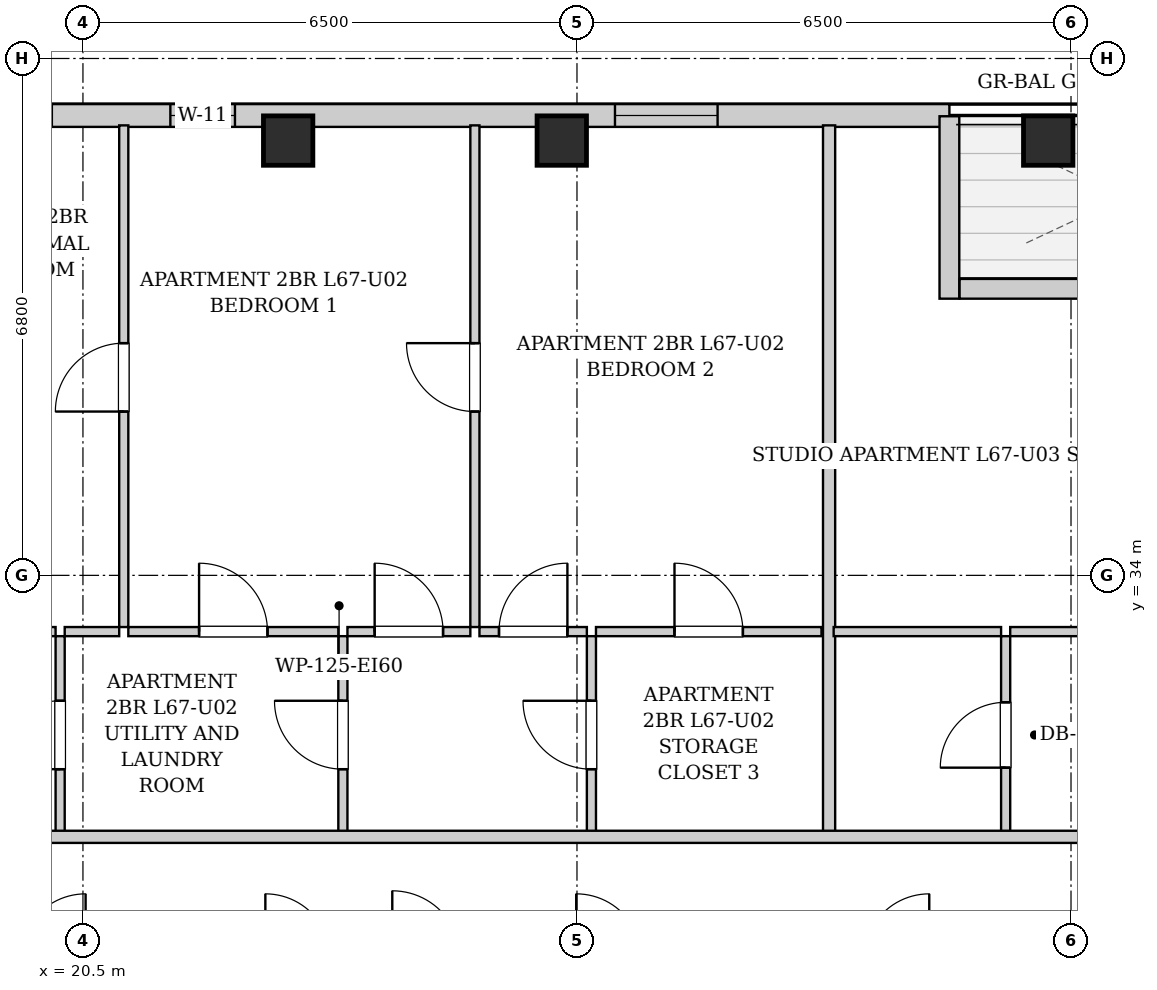
"""IFC4 building model, lengths in metres.
Left out: names, types, materials, properties, quantities, classifications, styles, units other than length and angle.
Written with IfcOpenShell. Run it as: python <this file> out.ifc"""

import sys

from ifc_helpers import new_model, si_unit, direction, frame, frame_2d, origin, origin_2d, place, context, subcontext, project, spatial, rectangle, extrude, element, fill, save


model = new_model("IFC4")
c1 = context("Model", 3, precision=1e-05, world=origin(), true_north=direction((0.0, 1.0)))
c2 = subcontext(c1, "Body", "Model", "MODEL_VIEW")
j1 = project(units=[si_unit("LENGTHUNIT", "METRE"), si_unit("PLANEANGLEUNIT", "RADIAN")], contexts=[c1])
p1 = place(None, origin())
s1 = spatial("IfcSite", under=j1, at=p1, CompositionType="ELEMENT")
p2 = place(p1, origin())
s2 = spatial("IfcBuilding", under=s1, at=p2, CompositionType="ELEMENT")
p3 = place(p2, frame((0.0, 0.0, 230.9)))
s3 = spatial("IfcBuildingStorey", under=s2, at=p3, CompositionType="ELEMENT", Elevation=230.9)
for number, where, z_axis, x_axis in (
    (1, (23.2, 39.72, 0.0), (0.0, 0.0, 1.0), (1.0, 0.0, 0.0)),
    (2, (26.8, 39.72, 0.0), (0.0, 0.0, 1.0), (1.0, 0.0, 0.0)),
    (3, (33.2, 39.72, 0.0), (0.0, 0.0, 1.0), (1.0, 0.0, 0.0)),
):
    element("IfcColumn", number, at=place(p3, frame(where, z_axis=z_axis, x_axis=x_axis)), inside=s3, PredefinedType="COLUMN", context=c2, shape_type="SweptSolid", body=[
        extrude(rectangle(XDim=0.65, YDim=0.65, at=origin_2d()), origin(), (0.0, 0.0, 1.0), 3.4),
    ])
p4 = place(p3, frame((13.1, 40.05, 0.0), z_axis=(0.0, 0.0, 1.0), x_axis=(1.0, 0.0, 0.0)))
e4 = element("IfcWall", 4, at=p4, inside=s3, PredefinedType="SOLIDWALL", context=c2, shape_type="SweptSolid", body=[
    extrude(rectangle(XDim=18.8, YDim=0.3, at=frame_2d((9.4, 0.0))), origin(), (0.0, 0.0, 1.0), 3.14),
])
p5 = place(p4, frame((1.806, 0.0, 0.55)))
e5 = element("IfcOpeningElement", 5, at=p5, cuts=e4, PredefinedType="OPENING", context=c2, shape_type="SweptSolid", body=[
    extrude(rectangle(XDim=1.35, YDim=1.2, at=frame_2d((0.675, 0.6))), frame((0.0, 0.16, 0.0), z_axis=(0.0, -1.0, 0.0), x_axis=(1.0, 0.0, 0.0)), (0.0, 0.0, 1.0), 0.32),
])
p6 = place(p4, frame((5.641, 0.0, 0.55)))
e6 = element("IfcOpeningElement", 6, at=p6, cuts=e4, PredefinedType="OPENING", context=c2, shape_type="SweptSolid", body=[
    extrude(rectangle(XDim=1.35, YDim=1.2, at=frame_2d((0.675, 0.6))), frame((0.0, 0.16, 0.0), z_axis=(0.0, -1.0, 0.0), x_axis=(1.0, 0.0, 0.0)), (0.0, 0.0, 1.0), 0.32),
])
p7 = place(p4, frame((8.55, 0.0, 0.55)))
e7 = element("IfcOpeningElement", 7, at=p7, cuts=e4, PredefinedType="OPENING", context=c2, shape_type="SweptSolid", body=[
    extrude(rectangle(XDim=0.85, YDim=1.2, at=frame_2d((0.425, 0.6))), frame((0.0, 0.16, 0.0), z_axis=(0.0, -1.0, 0.0), x_axis=(1.0, 0.0, 0.0)), (0.0, 0.0, 1.0), 0.32),
])
p8 = place(p4, frame((14.4, 0.0, 0.55)))
e8 = element("IfcOpeningElement", 8, at=p8, cuts=e4, PredefinedType="OPENING", context=c2, shape_type="SweptSolid", body=[
    extrude(rectangle(XDim=1.35, YDim=1.2, at=frame_2d((0.675, 0.6))), frame((0.0, 0.16, 0.0), z_axis=(0.0, -1.0, 0.0), x_axis=(1.0, 0.0, 0.0)), (0.0, 0.0, 1.0), 0.32),
])
p9 = place(p3, frame((31.9, 40.04, 0.0), z_axis=(0.0, 0.0, 1.0), x_axis=(0.0, -1.0, 0.0)))
e9 = element("IfcWall", 9, at=p9, inside=s3, PredefinedType="SOLIDWALL", context=c2, shape_type="SweptSolid", body=[
    extrude(rectangle(XDim=2.4, YDim=0.26, at=frame_2d((1.2, 0.0))), origin(), (0.0, 0.0, 1.0), 3.14),
])
p10 = place(p3, frame((32.034, 37.77, 0.0), z_axis=(0.0, 0.0, 1.0), x_axis=(1.0, 0.0, 0.0)))
e10 = element("IfcWall", 10, at=p10, inside=s3, PredefinedType="SOLIDWALL", context=c2, shape_type="SweptSolid", body=[
    extrude(rectangle(XDim=4.332, YDim=0.26, at=frame_2d((2.166, 0.0))), origin(), (0.0, 0.0, 1.0), 3.14),
])
p11 = place(p10, frame((1.616, 0.0, 0.0)))
e11 = element("IfcOpeningElement", 11, at=p11, cuts=e10, PredefinedType="OPENING", context=c2, shape_type="SweptSolid", body=[
    extrude(rectangle(XDim=1.1, YDim=2.0, at=frame_2d((0.55, 1.0))), frame((0.0, 0.14, 0.0), z_axis=(0.0, -1.0, 0.0), x_axis=(1.0, 0.0, 0.0)), (0.0, 0.0, 1.0), 0.28),
])
p12 = place(p3, frame((20.2, 30.6, 0.0), z_axis=(0.0, 0.0, 1.0), x_axis=(0.0, 1.0, 0.0)))
e12 = element("IfcWall", 12, at=p12, inside=s3, PredefinedType="PARTITIONING", context=c2, shape_type="SweptSolid", body=[
    extrude(rectangle(XDim=2.6, YDim=0.12, at=frame_2d((1.3, 0.0))), origin(), (0.0, 0.0, 1.0), 3.14),
])
p13 = place(p12, frame((0.85, 0.0, 0.0)))
e13 = element("IfcOpeningElement", 13, at=p13, cuts=e12, PredefinedType="OPENING", context=c2, shape_type="SweptSolid", body=[
    extrude(rectangle(XDim=0.9, YDim=2.05, at=frame_2d((0.45, 1.025))), frame((0.0, 0.07, 0.0), z_axis=(0.0, -1.0, 0.0), x_axis=(1.0, 0.0, 0.0)), (0.0, 0.0, 1.0), 0.14),
])
p14 = place(p3, frame((17.86, 33.26, 0.0), z_axis=(0.0, 0.0, 1.0), x_axis=(1.0, 0.0, 0.0)))
e14 = element("IfcWall", 14, at=p14, inside=s3, PredefinedType="PARTITIONING", context=c2, shape_type="SweptSolid", body=[
    extrude(rectangle(XDim=2.28, YDim=0.12, at=frame_2d((1.14, 0.0))), origin(), (0.0, 0.0, 1.0), 3.14),
])
p15 = place(p14, frame((0.69, 0.0, 0.0)))
e15 = element("IfcOpeningElement", 15, at=p15, cuts=e14, PredefinedType="OPENING", context=c2, shape_type="SweptSolid", body=[
    extrude(rectangle(XDim=0.9, YDim=2.05, at=frame_2d((0.45, 1.025))), frame((0.0, 0.07, 0.0), z_axis=(0.0, -1.0, 0.0), x_axis=(1.0, 0.0, 0.0)), (0.0, 0.0, 1.0), 0.14),
])
p16 = place(p3, frame((23.92, 30.6, 0.0), z_axis=(0.0, 0.0, 1.0), x_axis=(0.0, 1.0, 0.0)))
e16 = element("IfcWall", 16, at=p16, inside=s3, PredefinedType="PARTITIONING", context=c2, shape_type="SweptSolid", body=[
    extrude(rectangle(XDim=2.6, YDim=0.12, at=frame_2d((1.3, 0.0))), origin(), (0.0, 0.0, 1.0), 3.14),
])
p17 = place(p16, frame((0.85, 0.0, 0.0)))
e17 = element("IfcOpeningElement", 17, at=p17, cuts=e16, PredefinedType="OPENING", context=c2, shape_type="SweptSolid", body=[
    extrude(rectangle(XDim=0.9, YDim=2.05, at=frame_2d((0.45, 1.025))), frame((0.0, 0.07, 0.0), z_axis=(0.0, -1.0, 0.0), x_axis=(1.0, 0.0, 0.0)), (0.0, 0.0, 1.0), 0.14),
])
p18 = place(p3, frame((20.26, 33.26, 0.0), z_axis=(0.0, 0.0, 1.0), x_axis=(1.0, 0.0, 0.0)))
e18 = element("IfcWall", 18, at=p18, inside=s3, PredefinedType="PARTITIONING", context=c2, shape_type="SweptSolid", body=[
    extrude(rectangle(XDim=0.717, YDim=0.12, at=frame_2d((0.358, 0.0))), origin(), (0.0, 0.0, 1.0), 3.14),
])
p19 = place(p3, frame((21.097, 33.26, 0.0), z_axis=(0.0, 0.0, 1.0), x_axis=(1.0, 0.0, 0.0)))
e19 = element("IfcWall", 19, at=p19, inside=s3, PredefinedType="PARTITIONING", context=c2, shape_type="SweptSolid", body=[
    extrude(rectangle(XDim=2.763, YDim=0.12, at=frame_2d((1.382, 0.0))), origin(), (0.0, 0.0, 1.0), 3.14),
])
p20 = place(p19, frame((0.931, 0.0, 0.0)))
e20 = element("IfcOpeningElement", 20, at=p20, cuts=e19, PredefinedType="OPENING", context=c2, shape_type="SweptSolid", body=[
    extrude(rectangle(XDim=0.9, YDim=2.05, at=frame_2d((0.45, 1.025))), frame((0.0, 0.07, 0.0), z_axis=(0.0, -1.0, 0.0), x_axis=(1.0, 0.0, 0.0)), (0.0, 0.0, 1.0), 0.14),
])
p21 = place(p3, frame((27.19, 30.6, 0.0), z_axis=(0.0, 0.0, 1.0), x_axis=(0.0, 1.0, 0.0)))
e21 = element("IfcWall", 21, at=p21, inside=s3, PredefinedType="PARTITIONING", context=c2, shape_type="SweptSolid", body=[
    extrude(rectangle(XDim=2.6, YDim=0.12, at=frame_2d((1.3, 0.0))), origin(), (0.0, 0.0, 1.0), 3.14),
])
p22 = place(p21, frame((0.85, 0.0, 0.0)))
e22 = element("IfcOpeningElement", 22, at=p22, cuts=e21, PredefinedType="OPENING", context=c2, shape_type="SweptSolid", body=[
    extrude(rectangle(XDim=0.9, YDim=2.05, at=frame_2d((0.45, 1.025))), frame((0.0, 0.07, 0.0), z_axis=(0.0, -1.0, 0.0), x_axis=(1.0, 0.0, 0.0)), (0.0, 0.0, 1.0), 0.14),
])
p23 = place(p3, frame((23.98, 33.26, 0.0), z_axis=(0.0, 0.0, 1.0), x_axis=(1.0, 0.0, 0.0)))
e23 = element("IfcWall", 23, at=p23, inside=s3, PredefinedType="PARTITIONING", context=c2, shape_type="SweptSolid", body=[
    extrude(rectangle(XDim=1.617, YDim=0.12, at=frame_2d((0.809, 0.0))), origin(), (0.0, 0.0, 1.0), 3.14),
])
p24 = place(p23, frame((0.358, 0.0, 0.0)))
e24 = element("IfcOpeningElement", 24, at=p24, cuts=e23, PredefinedType="OPENING", context=c2, shape_type="SweptSolid", body=[
    extrude(rectangle(XDim=0.9, YDim=2.05, at=frame_2d((0.45, 1.025))), frame((0.0, 0.07, 0.0), z_axis=(0.0, -1.0, 0.0), x_axis=(1.0, 0.0, 0.0)), (0.0, 0.0, 1.0), 0.14),
])
p25 = place(p3, frame((25.717, 33.26, 0.0), z_axis=(0.0, 0.0, 1.0), x_axis=(1.0, 0.0, 0.0)))
e25 = element("IfcWall", 25, at=p25, inside=s3, PredefinedType="PARTITIONING", context=c2, shape_type="SweptSolid", body=[
    extrude(rectangle(XDim=1.413, YDim=0.12, at=frame_2d((0.707, 0.0))), origin(), (0.0, 0.0, 1.0), 3.14),
])
p26 = place(p25, frame((0.257, 0.0, 0.0)))
e26 = element("IfcOpeningElement", 26, at=p26, cuts=e25, PredefinedType="OPENING", context=c2, shape_type="SweptSolid", body=[
    extrude(rectangle(XDim=0.9, YDim=2.05, at=frame_2d((0.45, 1.025))), frame((0.0, 0.07, 0.0), z_axis=(0.0, -1.0, 0.0), x_axis=(1.0, 0.0, 0.0)), (0.0, 0.0, 1.0), 0.14),
])
p27 = place(p3, frame((27.25, 33.26, 0.0), z_axis=(0.0, 0.0, 1.0), x_axis=(1.0, 0.0, 0.0)))
e27 = element("IfcWall", 27, at=p27, inside=s3, PredefinedType="PARTITIONING", context=c2, shape_type="SweptSolid", body=[
    extrude(rectangle(XDim=2.967, YDim=0.12, at=frame_2d((1.483, 0.0))), origin(), (0.0, 0.0, 1.0), 3.14),
])
p28 = place(p27, frame((1.033, 0.0, 0.0)))
e28 = element("IfcOpeningElement", 28, at=p28, cuts=e27, PredefinedType="OPENING", context=c2, shape_type="SweptSolid", body=[
    extrude(rectangle(XDim=0.9, YDim=2.05, at=frame_2d((0.45, 1.025))), frame((0.0, 0.07, 0.0), z_axis=(0.0, -1.0, 0.0), x_axis=(1.0, 0.0, 0.0)), (0.0, 0.0, 1.0), 0.14),
])
p29 = place(p3, frame((21.037, 33.32, 0.0), z_axis=(0.0, 0.0, 1.0), x_axis=(0.0, 1.0, 0.0)))
e29 = element("IfcWall", 29, at=p29, inside=s3, PredefinedType="PARTITIONING", context=c2, shape_type="SweptSolid", body=[
    extrude(rectangle(XDim=6.6, YDim=0.12, at=frame_2d((3.3, 0.0))), origin(), (0.0, 0.0, 1.0), 3.14),
])
p30 = place(p29, frame((2.835, 0.0, 0.0)))
e30 = element("IfcOpeningElement", 30, at=p30, cuts=e29, PredefinedType="OPENING", context=c2, shape_type="SweptSolid", body=[
    extrude(rectangle(XDim=0.9, YDim=2.05, at=frame_2d((0.45, 1.025))), frame((0.0, 0.07, 0.0), z_axis=(0.0, -1.0, 0.0), x_axis=(1.0, 0.0, 0.0)), (0.0, 0.0, 1.0), 0.14),
])
p31 = place(p3, frame((25.657, 33.32, 0.0), z_axis=(0.0, 0.0, 1.0), x_axis=(0.0, 1.0, 0.0)))
e31 = element("IfcWall", 31, at=p31, inside=s3, PredefinedType="PARTITIONING", context=c2, shape_type="SweptSolid", body=[
    extrude(rectangle(XDim=6.6, YDim=0.12, at=frame_2d((3.3, 0.0))), origin(), (0.0, 0.0, 1.0), 3.14),
])
p32 = place(p31, frame((2.835, 0.0, 0.0)))
e32 = element("IfcOpeningElement", 32, at=p32, cuts=e31, PredefinedType="OPENING", context=c2, shape_type="SweptSolid", body=[
    extrude(rectangle(XDim=0.9, YDim=2.05, at=frame_2d((0.45, 1.025))), frame((0.0, 0.07, 0.0), z_axis=(0.0, -1.0, 0.0), x_axis=(1.0, 0.0, 0.0)), (0.0, 0.0, 1.0), 0.14),
])
p33 = place(p3, frame((30.317, 30.6, 0.0), z_axis=(0.0, 0.0, 1.0), x_axis=(0.0, 1.0, 0.0)))
e33 = element("IfcWall", 33, at=p33, inside=s3, PredefinedType="PARTITIONING", context=c2, shape_type="SweptSolid", body=[
    extrude(rectangle(XDim=9.32, YDim=0.16, at=frame_2d((4.66, 0.0))), origin(), (0.0, 0.0, 1.0), 3.14),
])
p34 = place(p3, frame((32.64, 30.6, 0.0), z_axis=(0.0, 0.0, 1.0), x_axis=(0.0, 1.0, 0.0)))
e34 = element("IfcWall", 34, at=p34, inside=s3, PredefinedType="PARTITIONING", context=c2, shape_type="SweptSolid", body=[
    extrude(rectangle(XDim=2.6, YDim=0.12, at=frame_2d((1.3, 0.0))), origin(), (0.0, 0.0, 1.0), 3.14),
])
p35 = place(p34, frame((0.87, 0.0, 0.0)))
e35 = element("IfcOpeningElement", 35, at=p35, cuts=e34, PredefinedType="OPENING", context=c2, shape_type="SweptSolid", body=[
    extrude(rectangle(XDim=0.86, YDim=2.05, at=frame_2d((0.43, 1.025))), frame((0.0, 0.07, 0.0), z_axis=(0.0, -1.0, 0.0), x_axis=(1.0, 0.0, 0.0)), (0.0, 0.0, 1.0), 0.14),
])
p36 = place(p3, frame((30.377, 33.26, 0.0), z_axis=(0.0, 0.0, 1.0), x_axis=(1.0, 0.0, 0.0)))
e36 = element("IfcWall", 36, at=p36, inside=s3, PredefinedType="PARTITIONING", context=c2, shape_type="SweptSolid", body=[
    extrude(rectangle(XDim=2.203, YDim=0.12, at=frame_2d((1.102, 0.0))), origin(), (0.0, 0.0, 1.0), 3.14),
])
p37 = place(p3, frame((32.7, 33.26, 0.0), z_axis=(0.0, 0.0, 1.0), x_axis=(1.0, 0.0, 0.0)))
e37 = element("IfcWall", 37, at=p37, inside=s3, PredefinedType="PARTITIONING", context=c2, shape_type="SweptSolid", body=[
    extrude(rectangle(XDim=5.02, YDim=0.12, at=frame_2d((2.51, 0.0))), origin(), (0.0, 0.0, 1.0), 3.14),
])
p38 = place(p37, frame((2.06, 0.0, 0.0)))
e38 = element("IfcOpeningElement", 38, at=p38, cuts=e37, PredefinedType="OPENING", context=c2, shape_type="SweptSolid", body=[
    extrude(rectangle(XDim=0.9, YDim=2.05, at=frame_2d((0.45, 1.025))), frame((0.0, 0.07, 0.0), z_axis=(0.0, -1.0, 0.0), x_axis=(1.0, 0.0, 0.0)), (0.0, 0.0, 1.0), 0.14),
])
p39 = place(p3, frame((13.15, 30.56, 0.0), z_axis=(0.0, 0.0, 1.0), x_axis=(1.0, 0.0, 0.0)))
e39 = element("IfcWall", 39, at=p39, inside=s3, PredefinedType="PARTITIONING", context=c2, shape_type="SweptSolid", body=[
    extrude(rectangle(XDim=24.6, YDim=0.16, at=frame_2d((12.3, 0.0))), origin(), (0.0, 0.0, 1.0), 3.14),
])
p40 = place(p39, frame((5.185, 0.0, 0.0)))
e40 = element("IfcOpeningElement", 40, at=p40, cuts=e39, PredefinedType="OPENING", context=c2, shape_type="SweptSolid", body=[
    extrude(rectangle(XDim=0.95, YDim=2.1, at=frame_2d((0.475, 1.05))), frame((0.0, 0.09, 0.0), z_axis=(0.0, -1.0, 0.0), x_axis=(1.0, 0.0, 0.0)), (0.0, 0.0, 1.0), 0.18),
])
p41 = place(p39, frame((21.55, 0.0, 0.0)))
e41 = element("IfcOpeningElement", 41, at=p41, cuts=e39, PredefinedType="OPENING", context=c2, shape_type="SweptSolid", body=[
    extrude(rectangle(XDim=0.95, YDim=2.1, at=frame_2d((0.475, 1.05))), frame((0.0, 0.09, 0.0), z_axis=(0.0, -1.0, 0.0), x_axis=(1.0, 0.0, 0.0)), (0.0, 0.0, 1.0), 0.18),
])
p42 = place(p13, origin())
e42 = element("IfcDoor", 42, at=p42, inside=s3, OperationType="SINGLE_SWING_LEFT", PredefinedType="DOOR", context=c2, shape_type="SweptSolid", body=[
    extrude(rectangle(XDim=0.9, YDim=2.05, at=frame_2d((0.45, 1.025))), frame((0.0, 0.025, 0.0), z_axis=(0.0, -1.0, 0.0), x_axis=(1.0, 0.0, 0.0)), (0.0, 0.0, 1.0), 0.05),
])
fill(e13, e42)
p43 = place(p17, origin())
e43 = element("IfcDoor", 43, at=p43, inside=s3, OperationType="SINGLE_SWING_RIGHT", PredefinedType="DOOR", context=c2, shape_type="SweptSolid", body=[
    extrude(rectangle(XDim=0.9, YDim=2.05, at=frame_2d((0.45, 1.025))), frame((0.0, 0.025, 0.0), z_axis=(0.0, -1.0, 0.0), x_axis=(1.0, 0.0, 0.0)), (0.0, 0.0, 1.0), 0.05),
])
fill(e17, e43)
p44 = place(p20, origin())
e44 = element("IfcDoor", 44, at=p44, inside=s3, OperationType="SINGLE_SWING_LEFT", PredefinedType="DOOR", context=c2, shape_type="SweptSolid", body=[
    extrude(rectangle(XDim=0.9, YDim=2.05, at=frame_2d((0.45, 1.025))), frame((0.0, 0.025, 0.0), z_axis=(0.0, -1.0, 0.0), x_axis=(1.0, 0.0, 0.0)), (0.0, 0.0, 1.0), 0.05),
])
fill(e20, e44)
p45 = place(p22, origin())
e45 = element("IfcDoor", 45, at=p45, inside=s3, OperationType="SINGLE_SWING_RIGHT", PredefinedType="DOOR", context=c2, shape_type="SweptSolid", body=[
    extrude(rectangle(XDim=0.9, YDim=2.05, at=frame_2d((0.45, 1.025))), frame((0.0, 0.025, 0.0), z_axis=(0.0, -1.0, 0.0), x_axis=(1.0, 0.0, 0.0)), (0.0, 0.0, 1.0), 0.05),
])
fill(e22, e45)
p46 = place(p24, origin())
e46 = element("IfcDoor", 46, at=p46, inside=s3, OperationType="SINGLE_SWING_LEFT", PredefinedType="DOOR", context=c2, shape_type="SweptSolid", body=[
    extrude(rectangle(XDim=0.9, YDim=2.05, at=frame_2d((0.45, 1.025))), frame((0.0, 0.025, 0.0), z_axis=(0.0, -1.0, 0.0), x_axis=(1.0, 0.0, 0.0)), (0.0, 0.0, 1.0), 0.05),
])
fill(e24, e46)
p47 = place(p26, origin())
e47 = element("IfcDoor", 47, at=p47, inside=s3, OperationType="SINGLE_SWING_RIGHT", PredefinedType="DOOR", context=c2, shape_type="SweptSolid", body=[
    extrude(rectangle(XDim=0.9, YDim=2.05, at=frame_2d((0.45, 1.025))), frame((0.0, 0.025, 0.0), z_axis=(0.0, -1.0, 0.0), x_axis=(1.0, 0.0, 0.0)), (0.0, 0.0, 1.0), 0.05),
])
fill(e26, e47)
p48 = place(p28, origin())
e48 = element("IfcDoor", 48, at=p48, inside=s3, OperationType="SINGLE_SWING_LEFT", PredefinedType="DOOR", context=c2, shape_type="SweptSolid", body=[
    extrude(rectangle(XDim=0.9, YDim=2.05, at=frame_2d((0.45, 1.025))), frame((0.0, 0.025, 0.0), z_axis=(0.0, -1.0, 0.0), x_axis=(1.0, 0.0, 0.0)), (0.0, 0.0, 1.0), 0.05),
])
fill(e28, e48)
p49 = place(p30, origin())
e49 = element("IfcDoor", 49, at=p49, inside=s3, OperationType="SINGLE_SWING_LEFT", PredefinedType="DOOR", context=c2, shape_type="SweptSolid", body=[
    extrude(rectangle(XDim=0.9, YDim=2.05, at=frame_2d((0.45, 1.025))), frame((0.0, 0.025, 0.0), z_axis=(0.0, -1.0, 0.0), x_axis=(1.0, 0.0, 0.0)), (0.0, 0.0, 1.0), 0.05),
])
fill(e30, e49)
p50 = place(p32, origin())
e50 = element("IfcDoor", 50, at=p50, inside=s3, OperationType="SINGLE_SWING_RIGHT", PredefinedType="DOOR", context=c2, shape_type="SweptSolid", body=[
    extrude(rectangle(XDim=0.9, YDim=2.05, at=frame_2d((0.45, 1.025))), frame((0.0, 0.025, 0.0), z_axis=(0.0, -1.0, 0.0), x_axis=(1.0, 0.0, 0.0)), (0.0, 0.0, 1.0), 0.05),
])
fill(e32, e50)
p51 = place(p35, origin())
e51 = element("IfcDoor", 51, at=p51, inside=s3, OperationType="SINGLE_SWING_LEFT", PredefinedType="DOOR", context=c2, shape_type="SweptSolid", body=[
    extrude(rectangle(XDim=0.86, YDim=2.05, at=frame_2d((0.43, 1.025))), frame((0.0, 0.025, 0.0), z_axis=(0.0, -1.0, 0.0), x_axis=(1.0, 0.0, 0.0)), (0.0, 0.0, 1.0), 0.05),
])
fill(e35, e51)
p52 = place(p7, origin())
e52 = element("IfcWindow", 52, at=p52, inside=s3, PartitioningType="SINGLE_PANEL", PredefinedType="WINDOW", context=c2, shape_type="SweptSolid", body=[
    extrude(rectangle(XDim=0.85, YDim=1.2, at=frame_2d((0.425, 0.6))), frame((0.0, 0.03, 0.0), z_axis=(0.0, -1.0, 0.0), x_axis=(1.0, 0.0, 0.0)), (0.0, 0.0, 1.0), 0.06),
])
fill(e7, e52)
p53 = place(p8, origin())
e53 = element("IfcWindow", 53, at=p53, inside=s3, PartitioningType="SINGLE_PANEL", PredefinedType="WINDOW", context=c2, shape_type="SweptSolid", body=[
    extrude(rectangle(XDim=1.35, YDim=1.2, at=frame_2d((0.675, 0.6))), frame((0.0, 0.03, 0.0), z_axis=(0.0, -1.0, 0.0), x_axis=(1.0, 0.0, 0.0)), (0.0, 0.0, 1.0), 0.06),
])
fill(e8, e53)
save(model, sys.argv[1])
